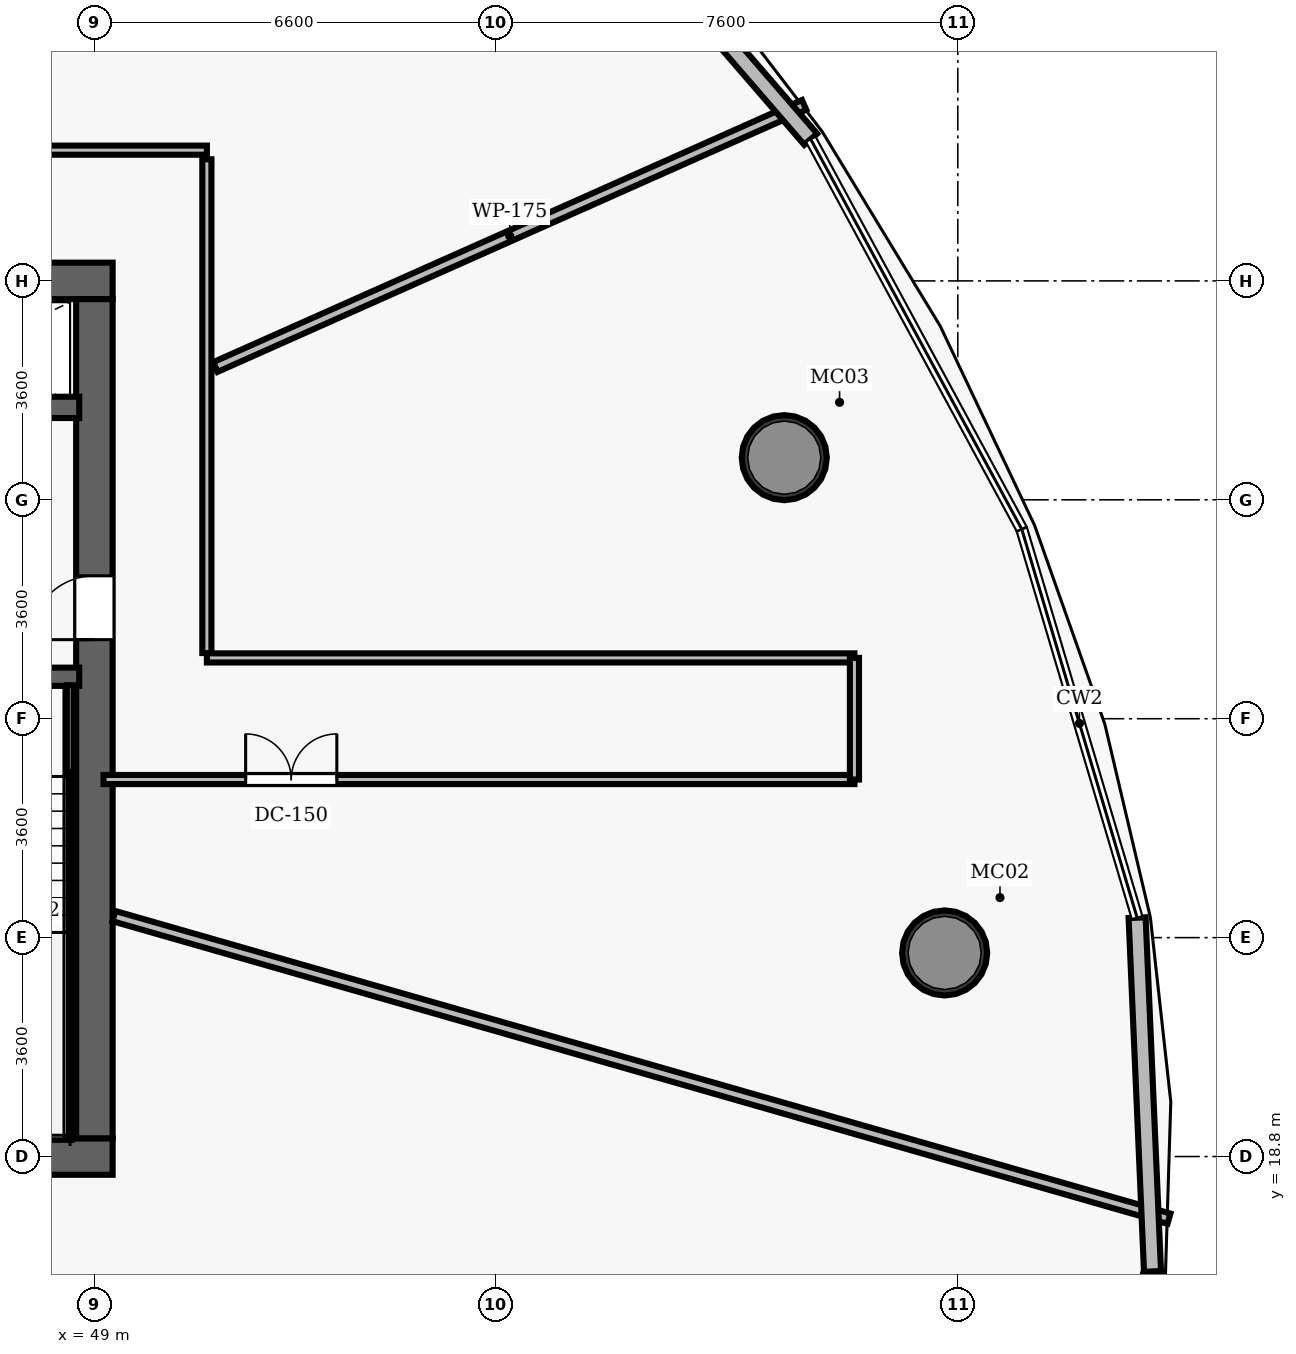
"""IFC4 building model, lengths in metres.
Left out: names, types, materials, properties, quantities, classifications, styles, units other than length and angle.
Written with IfcOpenShell. Run it as: python <this file> out.ifc"""

import sys

from ifc_helpers import new_model, si_unit, direction, frame, frame_2d, origin, origin_2d, place, context, subcontext, project, spatial, rectangle, hollow_circle, extrude, element, fill, save


model = new_model("IFC4")
c1 = context("Model", 3, precision=1e-05, world=origin(), true_north=direction((0.0, 1.0)))
c2 = subcontext(c1, "Body", "Model", "MODEL_VIEW")
j1 = project(units=[si_unit("LENGTHUNIT", "METRE"), si_unit("PLANEANGLEUNIT", "RADIAN")], contexts=[c1])
p1 = place(None, origin())
s1 = spatial("IfcSite", under=j1, at=p1, CompositionType="ELEMENT")
p2 = place(p1, origin())
s2 = spatial("IfcBuilding", under=s1, at=p2, CompositionType="ELEMENT")
p3 = place(p2, frame((0.0, 0.0, 141.3)))
s3 = spatial("IfcBuildingStorey", under=s2, at=p3, CompositionType="ELEMENT", Elevation=141.3)
p4 = place(p3, frame((26.7, 18.8, 0.0), z_axis=(0.0, 0.0, 1.0), x_axis=(1.0, 0.0, 0.0)))
e1 = element("IfcWall", 1, at=p4, inside=s3, PredefinedType="SHEAR", context=c2, shape_type="SweptSolid", body=[
    extrude(rectangle(XDim=22.6, YDim=0.6, at=frame_2d((11.3, 0.0))), origin(), (0.0, 0.0, 1.0), 3.5),
])
p5 = place(p4, frame((14.52, 0.0, 0.0)))
e2 = element("IfcOpeningElement", 2, at=p5, cuts=e1, PredefinedType="OPENING", context=c2, shape_type="SweptSolid", body=[
    extrude(rectangle(XDim=1.05, YDim=2.15, at=frame_2d((0.525, 1.075))), frame((0.0, 0.31, 0.0), z_axis=(0.0, -1.0, 0.0), x_axis=(1.0, 0.0, 0.0)), (0.0, 0.0, 1.0), 0.62),
])
p6 = place(p3, frame((26.7, 33.2, 0.0), z_axis=(0.0, 0.0, 1.0), x_axis=(1.0, 0.0, 0.0)))
e3 = element("IfcWall", 3, at=p6, inside=s3, PredefinedType="SHEAR", context=c2, shape_type="SweptSolid", body=[
    extrude(rectangle(XDim=22.6, YDim=0.6, at=frame_2d((11.3, 0.0))), origin(), (0.0, 0.0, 1.0), 3.5),
])
p7 = place(p6, frame((4.62, 0.0, 0.0)))
e4 = element("IfcOpeningElement", 4, at=p7, cuts=e3, PredefinedType="OPENING", context=c2, shape_type="SweptSolid", body=[
    extrude(rectangle(XDim=1.05, YDim=2.15, at=frame_2d((0.525, 1.075))), frame((0.0, 0.31, 0.0), z_axis=(0.0, -1.0, 0.0), x_axis=(1.0, 0.0, 0.0)), (0.0, 0.0, 1.0), 0.62),
])
p8 = place(p6, frame((14.52, 0.0, 0.0)))
e5 = element("IfcOpeningElement", 5, at=p8, cuts=e3, PredefinedType="OPENING", context=c2, shape_type="SweptSolid", body=[
    extrude(rectangle(XDim=1.05, YDim=2.15, at=frame_2d((0.525, 1.075))), frame((0.0, 0.31, 0.0), z_axis=(0.0, -1.0, 0.0), x_axis=(1.0, 0.0, 0.0)), (0.0, 0.0, 1.0), 0.62),
])
p9 = place(p3, frame((49.0, 19.1, 0.0), z_axis=(0.0, 0.0, 1.0), x_axis=(0.0, 1.0, 0.0)))
e6 = element("IfcWall", 6, at=p9, inside=s3, PredefinedType="SHEAR", context=c2, shape_type="SweptSolid", body=[
    extrude(rectangle(XDim=13.8, YDim=0.6, at=frame_2d((6.9, 0.0))), origin(), (0.0, 0.0, 1.0), 3.5),
])
p10 = place(p9, frame((8.2, 0.0, 0.0)))
e7 = element("IfcOpeningElement", 7, at=p10, cuts=e6, PredefinedType="OPENING", context=c2, shape_type="SweptSolid", body=[
    extrude(rectangle(XDim=1.05, YDim=2.15, at=frame_2d((0.525, 1.075))), frame((0.0, 0.31, 0.0), z_axis=(0.0, -1.0, 0.0), x_axis=(1.0, 0.0, 0.0)), (0.0, 0.0, 1.0), 0.62),
])
for number, where, z_axis, x_axis in (
    (8, (62.984, 22.148, 0.0), (0.0, 0.0, 1.0), (1.0, 0.0, 0.0)),
    (9, (60.346, 30.293, 0.0), (0.0, 0.0, 1.0), (1.0, 0.0, 0.0)),
):
    element("IfcColumn", number, at=place(p3, frame(where, z_axis=z_axis, x_axis=x_axis)), inside=s3, PredefinedType="COLUMN", context=c2, shape_type="SweptSolid", body=[
        extrude(hollow_circle(Radius=0.7, WallThickness=0.055, at=origin_2d()), origin(), (0.0, 0.0, 1.0), 3.5),
    ])
p11 = place(p3, frame((45.08, 26.69, 0.0), z_axis=(0.0, 0.0, 1.0), x_axis=(1.0, 0.0, 0.0)))
e10 = element("IfcWall", 10, at=p11, inside=s3, PredefinedType="SHEAR", context=c2, shape_type="SweptSolid", body=[
    extrude(rectangle(XDim=3.67, YDim=0.3, at=frame_2d((1.835, 0.0))), origin(), (0.0, 0.0, 1.0), 3.5),
])
p12 = place(p11, frame((1.05, 0.0, 0.0)))
e11 = element("IfcOpeningElement", 11, at=p12, cuts=e10, PredefinedType="OPENING", context=c2, shape_type="SweptSolid", body=[
    extrude(rectangle(XDim=1.1, YDim=2.15, at=frame_2d((0.55, 1.075))), frame((0.0, 0.16, 0.0), z_axis=(0.0, -1.0, 0.0), x_axis=(1.0, 0.0, 0.0)), (0.0, 0.0, 1.0), 0.32),
])
p13 = place(p3, frame((48.605, 19.1, 0.0), z_axis=(0.0, 0.0, 1.0), x_axis=(0.0, 1.0, 0.0)))
e12 = element("IfcWall", 12, at=p13, inside=s3, PredefinedType="SHEAR", context=c2, shape_type="SweptSolid", body=[
    extrude(rectangle(XDim=7.45, YDim=0.12, at=frame_2d((3.725, 0.0))), origin(), (0.0, 0.0, 1.0), 3.5),
])
p14 = place(p3, frame((45.51, 19.16, 0.0), z_axis=(0.0, 0.0, 1.0), x_axis=(1.0, 0.0, 0.0)))
e13 = element("IfcWall", 13, at=p14, inside=s3, PredefinedType="SHEAR", context=c2, shape_type="SweptSolid", body=[
    extrude(rectangle(XDim=3.095, YDim=0.12, at=frame_2d((1.547, 0.0))), origin(), (0.0, 0.0, 1.0), 3.5),
])
p15 = place(p3, frame((45.08, 31.12, 0.0), z_axis=(0.0, 0.0, 1.0), x_axis=(1.0, 0.0, 0.0)))
e14 = element("IfcWall", 14, at=p15, inside=s3, PredefinedType="SHEAR", context=c2, shape_type="SweptSolid", body=[
    extrude(rectangle(XDim=3.67, YDim=0.35, at=frame_2d((1.835, 0.0))), origin(), (0.0, 0.0, 1.0), 2.675),
])
p16 = place(p15, frame((1.25, 0.0, 0.0)))
e15 = element("IfcOpeningElement", 15, at=p16, cuts=e14, PredefinedType="OPENING", context=c2, shape_type="SweptSolid", body=[
    extrude(rectangle(XDim=1.1, YDim=2.15, at=frame_2d((0.55, 1.075))), frame((0.0, 0.185, 0.0), z_axis=(0.0, -1.0, 0.0), x_axis=(1.0, 0.0, 0.0)), (0.0, 0.0, 1.0), 0.37),
])
p17 = place(p3, frame((24.85, 35.35, 0.0), z_axis=(0.0, 0.0, 1.0), x_axis=(1.0, 0.0, 0.0)))
e16 = element("IfcWall", 16, at=p17, inside=s3, PredefinedType="PARTITIONING", context=c2, shape_type="SweptSolid", body=[
    extrude(rectangle(XDim=26.0, YDim=0.15, at=frame_2d((13.0, 0.0))), origin(), (0.0, 0.0, 1.0), 2.675),
])
p18 = place(p17, frame((18.854, 0.0, 0.0)))
e17 = element("IfcOpeningElement", 17, at=p18, cuts=e16, PredefinedType="OPENING", context=c2, shape_type="SweptSolid", body=[
    extrude(rectangle(XDim=1.5, YDim=2.2, at=frame_2d((0.75, 1.1))), frame((0.0, 0.085, 0.0), z_axis=(0.0, -1.0, 0.0), x_axis=(1.0, 0.0, 0.0)), (0.0, 0.0, 1.0), 0.17),
])
p19 = place(p17, frame((12.393, 0.0, 0.0)))
e18 = element("IfcOpeningElement", 18, at=p19, cuts=e16, PredefinedType="OPENING", context=c2, shape_type="SweptSolid", body=[
    extrude(rectangle(XDim=1.5, YDim=2.2, at=frame_2d((0.75, 1.1))), frame((0.0, 0.085, 0.0), z_axis=(0.0, -1.0, 0.0), x_axis=(1.0, 0.0, 0.0)), (0.0, 0.0, 1.0), 0.17),
])
p20 = place(p17, frame((6.73, 0.0, 0.0)))
e19 = element("IfcOpeningElement", 19, at=p20, cuts=e16, PredefinedType="OPENING", context=c2, shape_type="SweptSolid", body=[
    extrude(rectangle(XDim=0.95, YDim=2.15, at=frame_2d((0.475, 1.075))), frame((0.0, 0.085, 0.0), z_axis=(0.0, -1.0, 0.0), x_axis=(1.0, 0.0, 0.0)), (0.0, 0.0, 1.0), 0.17),
])
p21 = place(p3, frame((50.85, 27.08, 0.0), z_axis=(0.0, 0.0, 1.0), x_axis=(0.0, 1.0, 0.0)))
e20 = element("IfcWall", 20, at=p21, inside=s3, PredefinedType="PARTITIONING", context=c2, shape_type="SweptSolid", body=[
    extrude(rectangle(XDim=8.12, YDim=0.15, at=frame_2d((4.06, 0.0))), origin(), (0.0, 0.0, 1.0), 2.675),
])
p22 = place(p3, frame((50.85, 27.0, 0.0), z_axis=(0.0, 0.0, 1.0), x_axis=(1.0, 0.0, 0.0)))
e21 = element("IfcWall", 21, at=p22, inside=s3, PredefinedType="PARTITIONING", context=c2, shape_type="SweptSolid", body=[
    extrude(rectangle(XDim=10.65, YDim=0.15, at=frame_2d((5.325, 0.0))), origin(), (0.0, 0.0, 1.0), 2.675),
])
p23 = place(p3, frame((49.15, 25.0, 0.0), z_axis=(0.0, 0.0, 1.0), x_axis=(1.0, 0.0, 0.0)))
e22 = element("IfcWall", 22, at=p23, inside=s3, PredefinedType="PARTITIONING", context=c2, shape_type="SweptSolid", body=[
    extrude(rectangle(XDim=12.35, YDim=0.15, at=frame_2d((6.175, 0.0))), origin(), (0.0, 0.0, 1.0), 2.675),
])
p24 = place(p23, frame((2.337, 0.0, 0.0)))
e23 = element("IfcOpeningElement", 23, at=p24, cuts=e22, PredefinedType="OPENING", context=c2, shape_type="SweptSolid", body=[
    extrude(rectangle(XDim=1.5, YDim=2.2, at=frame_2d((0.75, 1.1))), frame((0.0, 0.085, 0.0), z_axis=(0.0, -1.0, 0.0), x_axis=(1.0, 0.0, 0.0)), (0.0, 0.0, 1.0), 0.17),
])
p25 = place(p3, frame((61.5, 25.0, 0.0), z_axis=(0.0, 0.0, 1.0), x_axis=(0.0, 1.0, 0.0)))
e24 = element("IfcWall", 24, at=p25, inside=s3, PredefinedType="PARTITIONING", context=c2, shape_type="SweptSolid", body=[
    extrude(rectangle(XDim=2.0, YDim=0.15, at=frame_2d((1.0, 0.0))), origin(), (0.0, 0.0, 1.0), 2.675),
])
p26 = place(p3, frame((50.99, 31.783, 0.0), z_axis=(0.0, 0.0, 1.0), x_axis=(0.913539675271, 0.406749630246, 0.0)))
e25 = element("IfcWall", 25, at=p26, inside=s3, PredefinedType="PARTITIONING", context=c2, shape_type="SweptSolid", body=[
    extrude(rectangle(XDim=10.599, YDim=0.175, at=frame_2d((5.299, 0.0))), origin(), (0.0, 0.0, 1.0), 2.675),
])
p27 = place(p3, frame((43.072, 18.48, 0.0), z_axis=(0.0, 0.0, 1.0), x_axis=(0.559193636848, -0.829037077885, 0.0)))
e26 = element("IfcWall", 26, at=p27, inside=s3, PredefinedType="PARTITIONING", context=c2, shape_type="SweptSolid", body=[
    extrude(rectangle(XDim=18.398, YDim=0.175, at=frame_2d((9.199, 0.0))), origin(), (0.0, 0.0, 1.0), 2.675),
])
p28 = place(p3, frame((49.32, 22.754, 0.0), z_axis=(0.0, 0.0, 1.0), x_axis=(0.961265285636, -0.275624836744, 0.0)))
e27 = element("IfcWall", 27, at=p28, inside=s3, PredefinedType="PARTITIONING", context=c2, shape_type="SweptSolid", body=[
    extrude(rectangle(XDim=18.052, YDim=0.175, at=frame_2d((9.026, 0.0))), origin(), (0.0, 0.0, 1.0), 2.675),
])
p29 = place(p3, frame((66.402, 16.911, 0.0), z_axis=(0.0, 0.0, 1.0), x_axis=(-0.283514780362, -0.958967866676, 0.0)))
e28 = element("IfcWall", 28, at=p29, inside=s3, PredefinedType="SOLIDWALL", context=c2, shape_type="SweptSolid", body=[
    extrude(rectangle(XDim=5.175, YDim=0.28, at=frame_2d((2.587, 0.0))), origin(), (0.0, 0.0, 1.0), 3.26),
])
p30 = place(p3, frame((66.149, 22.728, 0.0), z_axis=(0.0, 0.0, 1.0), x_axis=(0.043480894207, -0.999054258706, 0.0)))
e29 = element("IfcWall", 29, at=p30, inside=s3, PredefinedType="SOLIDWALL", context=c2, shape_type="SweptSolid", body=[
    extrude(rectangle(XDim=5.823, YDim=0.28, at=frame_2d((2.911, 0.0))), origin(), (0.0, 0.0, 1.0), 3.26),
])
p31 = place(p3, frame((55.83, 41.255, 0.0), z_axis=(0.0, 0.0, 1.0), x_axis=(0.654081612585, -0.756423984336, 0.0)))
e30 = element("IfcWall", 30, at=p31, inside=s3, PredefinedType="SOLIDWALL", context=c2, shape_type="SweptSolid", body=[
    extrude(rectangle(XDim=7.569, YDim=0.28, at=frame_2d((3.785, 0.0))), origin(), (0.0, 0.0, 1.0), 3.26),
])
p32 = place(p10, origin())
e31 = element("IfcDoor", 31, at=p32, inside=s3, OperationType="SINGLE_SWING_LEFT", PredefinedType="DOOR", context=c2, shape_type="SweptSolid", body=[
    extrude(rectangle(XDim=1.05, YDim=2.15, at=frame_2d((0.525, 1.075))), frame((0.0, 0.025, 0.0), z_axis=(0.0, -1.0, 0.0), x_axis=(1.0, 0.0, 0.0)), (0.0, 0.0, 1.0), 0.05),
])
fill(e7, e31)
p33 = place(p24, origin())
e32 = element("IfcDoor", 32, at=p33, inside=s3, OperationType="DOUBLE_DOOR_SINGLE_SWING", PredefinedType="DOOR", context=c2, shape_type="SweptSolid", body=[
    extrude(rectangle(XDim=1.5, YDim=2.2, at=frame_2d((0.75, 1.1))), frame((0.0, 0.025, 0.0), z_axis=(0.0, -1.0, 0.0), x_axis=(1.0, 0.0, 0.0)), (0.0, 0.0, 1.0), 0.05),
])
fill(e23, e32)
save(model, sys.argv[1])
